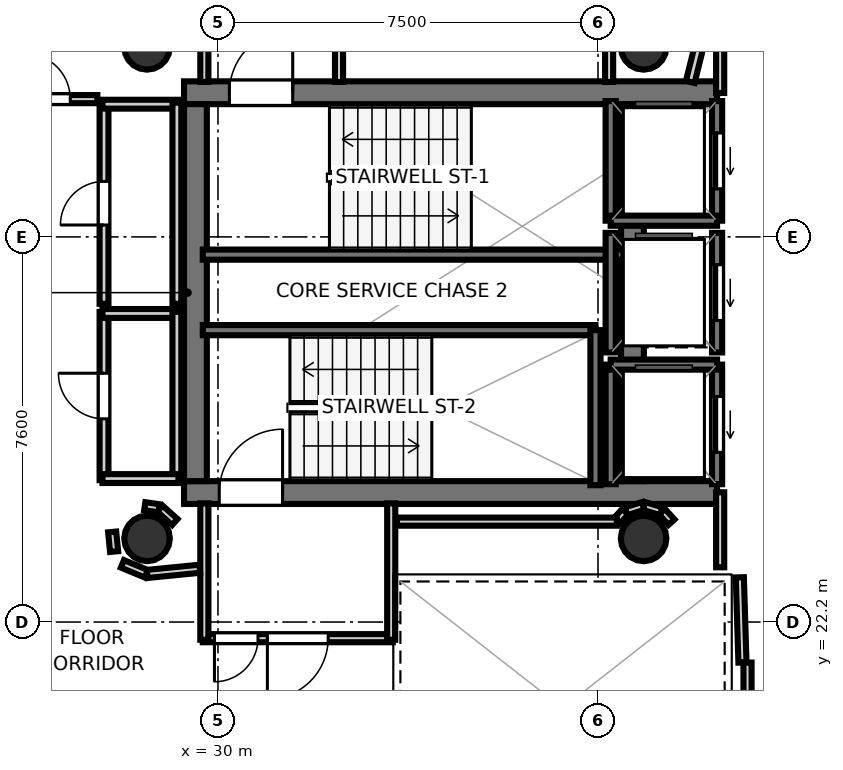
"""IFC4 building model, lengths in metres.
Left out: names, types, materials, properties, quantities, classifications, styles, units other than length and angle.
Written with IfcOpenShell. Run it as: python <this file> out.ifc"""

import sys

from ifc_helpers import new_model, si_unit, direction, frame, frame_2d, origin, origin_2d, place, context, subcontext, project, spatial, rectangle, hollow_circle, extrude, element, fill, save


model = new_model("IFC4")
c1 = context("Model", 3, precision=1e-05, world=origin(), true_north=direction((0.0, 1.0)))
c2 = subcontext(c1, "Body", "Model", "MODEL_VIEW")
j1 = project(units=[si_unit("LENGTHUNIT", "METRE"), si_unit("PLANEANGLEUNIT", "RADIAN")], contexts=[c1])
p1 = place(None, origin())
s1 = spatial("IfcSite", under=j1, at=p1, CompositionType="ELEMENT")
p2 = place(p1, origin())
s2 = spatial("IfcBuilding", under=s1, at=p2, CompositionType="ELEMENT")
p3 = place(p2, frame((0.0, 0.0, 310.2)))
s3 = spatial("IfcBuildingStorey", under=s2, at=p3, CompositionType="ELEMENT", Elevation=310.2)
p4 = place(p3, frame((29.33, 32.645, 0.0), z_axis=(0.0, 0.0, 1.0), x_axis=(1.0, 0.0, 0.0)))
e1 = element("IfcWall", 1, at=p4, inside=s3, PredefinedType="SHEAR", context=c2, shape_type="SweptSolid", body=[
    extrude(rectangle(XDim=10.52, YDim=0.45, at=frame_2d((5.26, 0.0))), origin(), (0.0, 0.0, 1.0), 3.52),
])
p5 = place(p4, frame((0.895, 0.0, 0.0)))
e2 = element("IfcOpeningElement", 2, at=p5, cuts=e1, PredefinedType="OPENING", context=c2, shape_type="SweptSolid", body=[
    extrude(rectangle(XDim=1.25, YDim=2.15, at=frame_2d((0.625, 1.075))), frame((0.0, 0.235, 0.0), z_axis=(0.0, -1.0, 0.0), x_axis=(1.0, 0.0, 0.0)), (0.0, 0.0, 1.0), 0.47),
])
p6 = place(p3, frame((29.33, 24.755, 0.0), z_axis=(0.0, 0.0, 1.0), x_axis=(1.0, 0.0, 0.0)))
e3 = element("IfcWall", 3, at=p6, inside=s3, PredefinedType="SHEAR", context=c2, shape_type="SweptSolid", body=[
    extrude(rectangle(XDim=10.52, YDim=0.45, at=frame_2d((5.26, 0.0))), origin(), (0.0, 0.0, 1.0), 3.52),
])
p7 = place(p6, frame((0.695, 0.0, 0.0)))
e4 = element("IfcOpeningElement", 4, at=p7, cuts=e3, PredefinedType="OPENING", context=c2, shape_type="SweptSolid", body=[
    extrude(rectangle(XDim=1.25, YDim=2.15, at=frame_2d((0.625, 1.075))), frame((0.0, 0.235, 0.0), z_axis=(0.0, -1.0, 0.0), x_axis=(1.0, 0.0, 0.0)), (0.0, 0.0, 1.0), 0.47),
])
for number, where, z_axis, x_axis in (
    (5, (29.555, 24.98, 0.0), (0.0, 0.0, 1.0), (0.0, 1.0, 0.0)),
    (6, (38.18, 24.98, 0.0), (0.0, 0.0, 1.0), (0.0, 1.0, 0.0)),
):
    element("IfcWall", number, at=place(p3, frame(where, z_axis=z_axis, x_axis=x_axis)), inside=s3, PredefinedType="SHEAR", context=c2, shape_type="SweptSolid", body=[
        extrude(rectangle(XDim=7.44, YDim=0.45, at=frame_2d((3.72, 0.0))), origin(), (0.0, 0.0, 1.0), 3.52),
    ])
for number, where, z_axis, x_axis in (
    (7, (28.6, 33.55, 0.0), (0.0, 0.0, 1.0), (1.0, 0.0, 0.0)),
    (8, (28.6, 23.85, 0.0), (0.0, 0.0, 1.0), (1.0, 0.0, 0.0)),
    (9, (38.4, 33.55, 0.0), (0.0, 0.0, 1.0), (1.0, 0.0, 0.0)),
    (10, (38.4, 23.85, 0.0), (0.0, 0.0, 1.0), (1.0, 0.0, 0.0)),
):
    element("IfcColumn", number, at=place(p3, frame(where, z_axis=z_axis, x_axis=x_axis)), inside=s3, PredefinedType="COLUMN", context=c2, shape_type="SweptSolid", body=[
        extrude(hollow_circle(Radius=0.45, WallThickness=0.025, at=origin_2d()), origin(), (0.0, 0.0, 1.0), 3.7),
    ])
p8 = place(p3, frame((29.7, 29.45, 0.0), z_axis=(0.0, 0.0, 1.0), x_axis=(1.0, 0.0, 0.0)))
e11 = element("IfcWall", 11, at=p8, inside=s3, PredefinedType="SOLIDWALL", context=c2, shape_type="SweptSolid", body=[
    extrude(rectangle(XDim=8.3, YDim=0.2, at=frame_2d((4.15, 0.0))), origin(), (0.0, 0.0, 1.0), 3.52),
])
p9 = place(p3, frame((29.7, 27.96, 0.0), z_axis=(0.0, 0.0, 1.0), x_axis=(1.0, 0.0, 0.0)))
e12 = element("IfcWall", 12, at=p9, inside=s3, PredefinedType="SOLIDWALL", context=c2, shape_type="SweptSolid", body=[
    extrude(rectangle(XDim=7.75, YDim=0.2, at=frame_2d((3.875, 0.0))), origin(), (0.0, 0.0, 1.0), 3.52),
])
p10 = place(p3, frame((37.45, 24.9, 0.0), z_axis=(0.0, 0.0, 1.0), x_axis=(0.0, 1.0, 0.0)))
e13 = element("IfcWall", 13, at=p10, inside=s3, PredefinedType="SOLIDWALL", context=c2, shape_type="SweptSolid", body=[
    extrude(rectangle(XDim=3.06, YDim=0.2, at=frame_2d((1.53, 0.0))), origin(), (0.0, 0.0, 1.0), 3.52),
])
p11 = place(p3, frame((39.85, 30.12, 0.0), z_axis=(0.0, 0.0, 1.0), x_axis=(0.0, 1.0, 0.0)))
e14 = element("IfcWall", 14, at=p11, inside=s3, PredefinedType="SOLIDWALL", context=c2, shape_type="SweptSolid", body=[
    extrude(rectangle(XDim=2.36, YDim=0.2, at=frame_2d((1.18, 0.0))), origin(), (0.0, 0.0, 1.0), 3.52),
])
p12 = place(p11, frame((0.63, 0.0, 0.0)))
e15 = element("IfcOpeningElement", 15, at=p12, cuts=e14, PredefinedType="OPENING", context=c2, shape_type="SweptSolid", body=[
    extrude(rectangle(XDim=1.1, YDim=2.15, at=frame_2d((0.55, 1.075))), frame((0.0, 0.11, 0.0), z_axis=(0.0, -1.0, 0.0), x_axis=(1.0, 0.0, 0.0)), (0.0, 0.0, 1.0), 0.22),
])
p13 = place(p3, frame((37.75, 30.12, 0.0), z_axis=(0.0, 0.0, 1.0), x_axis=(0.0, 1.0, 0.0)))
e16 = element("IfcWall", 16, at=p13, inside=s3, PredefinedType="SOLIDWALL", context=c2, shape_type="SweptSolid", body=[
    extrude(rectangle(XDim=2.36, YDim=0.2, at=frame_2d((1.18, 0.0))), origin(), (0.0, 0.0, 1.0), 3.52),
])
p14 = place(p3, frame((37.75, 30.12, 0.0), z_axis=(0.0, 0.0, 1.0), x_axis=(1.0, 0.0, 0.0)))
e17 = element("IfcWall", 17, at=p14, inside=s3, PredefinedType="SOLIDWALL", context=c2, shape_type="SweptSolid", body=[
    extrude(rectangle(XDim=2.1, YDim=0.2, at=frame_2d((1.05, 0.0))), origin(), (0.0, 0.0, 1.0), 3.52),
])
p15 = place(p3, frame((39.85, 24.92, 0.0), z_axis=(0.0, 0.0, 1.0), x_axis=(0.0, 1.0, 0.0)))
e18 = element("IfcWall", 18, at=p15, inside=s3, PredefinedType="SOLIDWALL", context=c2, shape_type="SweptSolid", body=[
    extrude(rectangle(XDim=2.36, YDim=0.2, at=frame_2d((1.18, 0.0))), origin(), (0.0, 0.0, 1.0), 3.52),
])
p16 = place(p15, frame((0.63, 0.0, 0.0)))
e19 = element("IfcOpeningElement", 19, at=p16, cuts=e18, PredefinedType="OPENING", context=c2, shape_type="SweptSolid", body=[
    extrude(rectangle(XDim=1.1, YDim=2.15, at=frame_2d((0.55, 1.075))), frame((0.0, 0.11, 0.0), z_axis=(0.0, -1.0, 0.0), x_axis=(1.0, 0.0, 0.0)), (0.0, 0.0, 1.0), 0.22),
])
p17 = place(p3, frame((37.75, 24.92, 0.0), z_axis=(0.0, 0.0, 1.0), x_axis=(0.0, 1.0, 0.0)))
e20 = element("IfcWall", 20, at=p17, inside=s3, PredefinedType="SOLIDWALL", context=c2, shape_type="SweptSolid", body=[
    extrude(rectangle(XDim=2.36, YDim=0.2, at=frame_2d((1.18, 0.0))), origin(), (0.0, 0.0, 1.0), 3.52),
])
p18 = place(p3, frame((37.75, 27.28, 0.0), z_axis=(0.0, 0.0, 1.0), x_axis=(1.0, 0.0, 0.0)))
e21 = element("IfcWall", 21, at=p18, inside=s3, PredefinedType="SOLIDWALL", context=c2, shape_type="SweptSolid", body=[
    extrude(rectangle(XDim=2.1, YDim=0.2, at=frame_2d((1.05, 0.0))), origin(), (0.0, 0.0, 1.0), 3.52),
])
p19 = place(p3, frame((39.85, 27.52, 0.0), z_axis=(0.0, 0.0, 1.0), x_axis=(0.0, 1.0, 0.0)))
e22 = element("IfcWall", 22, at=p19, inside=s3, PredefinedType="SOLIDWALL", context=c2, shape_type="SweptSolid", body=[
    extrude(rectangle(XDim=2.36, YDim=0.2, at=frame_2d((1.18, 0.0))), origin(), (0.0, 0.0, 1.0), 3.52),
])
p20 = place(p19, frame((0.63, 0.0, 0.0)))
e23 = element("IfcOpeningElement", 23, at=p20, cuts=e22, PredefinedType="OPENING", context=c2, shape_type="SweptSolid", body=[
    extrude(rectangle(XDim=1.1, YDim=2.15, at=frame_2d((0.55, 1.075))), frame((0.0, 0.11, 0.0), z_axis=(0.0, -1.0, 0.0), x_axis=(1.0, 0.0, 0.0)), (0.0, 0.0, 1.0), 0.22),
])
p21 = place(p3, frame((37.75, 27.52, 0.0), z_axis=(0.0, 0.0, 1.0), x_axis=(0.0, 1.0, 0.0)))
e24 = element("IfcWall", 24, at=p21, inside=s3, PredefinedType="SOLIDWALL", context=c2, shape_type="SweptSolid", body=[
    extrude(rectangle(XDim=2.36, YDim=0.2, at=frame_2d((1.18, 0.0))), origin(), (0.0, 0.0, 1.0), 3.52),
])
p22 = place(p3, frame((29.731, 32.858, 0.0), z_axis=(0.0, 0.0, 1.0), x_axis=(0.0, 1.0, 0.0)))
e25 = element("IfcWall", 25, at=p22, inside=s3, PredefinedType="PARTITIONING", context=c2, shape_type="SweptSolid", body=[
    extrude(rectangle(XDim=2.193, YDim=0.16, at=frame_2d((1.096, 0.0))), origin(), (0.0, 0.0, 1.0), 2.84),
])
p23 = place(p3, frame((32.389, 35.708, 0.0), z_axis=(0.0, 0.0, 1.0), x_axis=(0.0, -1.0, 0.0)))
e26 = element("IfcWall", 26, at=p23, inside=s3, PredefinedType="PARTITIONING", context=c2, shape_type="SweptSolid", body=[
    extrude(rectangle(XDim=2.85, YDim=0.16, at=frame_2d((1.425, 0.0))), origin(), (0.0, 0.0, 1.0), 2.84),
])
p24 = place(p3, frame((33.45, 21.881, 0.0), z_axis=(0.0, 0.0, 1.0), x_axis=(-1.0, 0.0, 0.0)))
e27 = element("IfcWall", 27, at=p24, inside=s3, PredefinedType="PARTITIONING", context=c2, shape_type="SweptSolid", body=[
    extrude(rectangle(XDim=3.75, YDim=0.16, at=frame_2d((1.875, 0.0))), origin(), (0.0, 0.0, 1.0), 2.84),
])
p25 = place(p24, frame((1.275, 0.0, 0.0)))
e28 = element("IfcOpeningElement", 28, at=p25, cuts=e27, PredefinedType="OPENING", context=c2, shape_type="SweptSolid", body=[
    extrude(rectangle(XDim=1.2, YDim=2.15, at=frame_2d((0.6, 1.075))), frame((0.0, 0.09, 0.0), z_axis=(0.0, -1.0, 0.0), x_axis=(1.0, 0.0, 0.0)), (0.0, 0.0, 1.0), 0.18),
])
p26 = place(p24, frame((2.66, 0.0, 0.0)))
e29 = element("IfcOpeningElement", 29, at=p26, cuts=e27, PredefinedType="OPENING", context=c2, shape_type="SweptSolid", body=[
    extrude(rectangle(XDim=0.86, YDim=2.05, at=frame_2d((0.43, 1.025))), frame((0.0, 0.09, 0.0), z_axis=(0.0, -1.0, 0.0), x_axis=(1.0, 0.0, 0.0)), (0.0, 0.0, 1.0), 0.18),
])
for number, where, z_axis, x_axis in (
    (30, (29.731, 21.85, 0.0), (0.0, 0.0, 1.0), (0.0, 1.0, 0.0)),
    (31, (33.419, 24.542, 0.0), (0.0, 0.0, 1.0), (0.0, -1.0, 0.0)),
):
    element("IfcWall", number, at=place(p3, frame(where, z_axis=z_axis, x_axis=x_axis)), inside=s3, PredefinedType="PARTITIONING", context=c2, shape_type="SweptSolid", body=[
        extrude(rectangle(XDim=2.692, YDim=0.16, at=frame_2d((1.346, 0.0))), origin(), (0.0, 0.0, 1.0), 2.84),
    ])
p27 = place(p3, frame((40.351, 21.401, 0.0), z_axis=(0.0, 0.0, 1.0), x_axis=(-0.031058045979, 0.999517582527, 0.0)))
e32 = element("IfcWall", 32, at=p27, inside=s3, PredefinedType="PARTITIONING", context=c2, shape_type="SweptSolid", body=[
    extrude(rectangle(XDim=1.682, YDim=0.16, at=frame_2d((0.841, 0.0))), origin(), (0.0, 0.0, 1.0), 2.84),
])
p28 = place(p3, frame((39.911, 23.28, 0.0), z_axis=(0.0, 0.0, 1.0), x_axis=(0.0, 1.0, 0.0)))
e33 = element("IfcWall", 33, at=p28, inside=s3, PredefinedType="PARTITIONING", context=c2, shape_type="SweptSolid", body=[
    extrude(rectangle(XDim=1.48, YDim=0.16, at=frame_2d((0.74, 0.0))), origin(), (0.0, 0.0, 1.0), 2.84),
])
p29 = place(p3, frame((39.911, 32.64, 0.0), z_axis=(0.0, 0.0, 1.0), x_axis=(0.0, 1.0, 0.0)))
e34 = element("IfcWall", 34, at=p29, inside=s3, PredefinedType="PARTITIONING", context=c2, shape_type="SweptSolid", body=[
    extrude(rectangle(XDim=2.88, YDim=0.16, at=frame_2d((1.44, 0.0))), origin(), (0.0, 0.0, 1.0), 2.84),
])
p30 = place(p3, frame((40.451, 18.08, 0.0), z_axis=(0.0, 0.0, 1.0), x_axis=(0.0, 1.0, 0.0)))
e35 = element("IfcWall", 35, at=p30, inside=s3, PredefinedType="PARTITIONING", context=c2, shape_type="SweptSolid", body=[
    extrude(rectangle(XDim=3.32, YDim=0.16, at=frame_2d((1.66, 0.0))), origin(), (0.0, 0.0, 1.0), 2.84),
])
p31 = place(p3, frame((27.751, 25.0, 0.0), z_axis=(0.0, 0.0, 1.0), x_axis=(0.0, 1.0, 0.0)))
e36 = element("IfcWall", 36, at=p31, inside=s3, PredefinedType="PLUMBINGWALL", context=c2, shape_type="SweptSolid", body=[
    extrude(rectangle(XDim=3.32, YDim=0.175, at=frame_2d((1.66, 0.0))), origin(), (0.0, 0.0, 1.0), 2.84),
])
p32 = place(p31, frame((1.21, 0.0, 0.0)))
e37 = element("IfcOpeningElement", 37, at=p32, cuts=e36, PredefinedType="OPENING", context=c2, shape_type="SweptSolid", body=[
    extrude(rectangle(XDim=0.9, YDim=2.1, at=frame_2d((0.45, 1.05))), frame((0.0, 0.097, 0.0), z_axis=(0.0, -1.0, 0.0), x_axis=(1.0, 0.0, 0.0)), (0.0, 0.0, 1.0), 0.195),
])
p33 = place(p3, frame((27.72, 28.289, 0.0), z_axis=(0.0, 0.0, 1.0), x_axis=(1.0, 0.0, 0.0)))
e38 = element("IfcWall", 38, at=p33, inside=s3, PredefinedType="PLUMBINGWALL", context=c2, shape_type="SweptSolid", body=[
    extrude(rectangle(XDim=1.5, YDim=0.175, at=frame_2d((0.75, 0.0))), origin(), (0.0, 0.0, 1.0), 2.84),
])
p34 = place(p3, frame((29.189, 28.32, 0.0), z_axis=(0.0, 0.0, 1.0), x_axis=(0.0, -1.0, 0.0)))
e39 = element("IfcWall", 39, at=p34, inside=s3, PredefinedType="PLUMBINGWALL", context=c2, shape_type="SweptSolid", body=[
    extrude(rectangle(XDim=3.32, YDim=0.175, at=frame_2d((1.66, 0.0))), origin(), (0.0, 0.0, 1.0), 2.84),
])
p35 = place(p3, frame((29.22, 25.031, 0.0), z_axis=(0.0, 0.0, 1.0), x_axis=(-1.0, 0.0, 0.0)))
e40 = element("IfcWall", 40, at=p35, inside=s3, PredefinedType="PLUMBINGWALL", context=c2, shape_type="SweptSolid", body=[
    extrude(rectangle(XDim=1.5, YDim=0.175, at=frame_2d((0.75, 0.0))), origin(), (0.0, 0.0, 1.0), 2.84),
])
p36 = place(p3, frame((27.751, 28.48, 0.0), z_axis=(0.0, 0.0, 1.0), x_axis=(0.0, 1.0, 0.0)))
e41 = element("IfcWall", 41, at=p36, inside=s3, PredefinedType="PLUMBINGWALL", context=c2, shape_type="SweptSolid", body=[
    extrude(rectangle(XDim=3.97, YDim=0.175, at=frame_2d((1.985, 0.0))), origin(), (0.0, 0.0, 1.0), 2.84),
])
p37 = place(p36, frame((1.555, 0.0, 0.0)))
e42 = element("IfcOpeningElement", 42, at=p37, cuts=e41, PredefinedType="OPENING", context=c2, shape_type="SweptSolid", body=[
    extrude(rectangle(XDim=0.86, YDim=2.05, at=frame_2d((0.43, 1.025))), frame((0.0, 0.097, 0.0), z_axis=(0.0, -1.0, 0.0), x_axis=(1.0, 0.0, 0.0)), (0.0, 0.0, 1.0), 0.195),
])
p38 = place(p3, frame((27.72, 32.419, 0.0), z_axis=(0.0, 0.0, 1.0), x_axis=(1.0, 0.0, 0.0)))
e43 = element("IfcWall", 43, at=p38, inside=s3, PredefinedType="PLUMBINGWALL", context=c2, shape_type="SweptSolid", body=[
    extrude(rectangle(XDim=1.5, YDim=0.175, at=frame_2d((0.75, 0.0))), origin(), (0.0, 0.0, 1.0), 2.84),
])
p39 = place(p3, frame((29.189, 32.45, 0.0), z_axis=(0.0, 0.0, 1.0), x_axis=(0.0, -1.0, 0.0)))
e44 = element("IfcWall", 44, at=p39, inside=s3, PredefinedType="PLUMBINGWALL", context=c2, shape_type="SweptSolid", body=[
    extrude(rectangle(XDim=3.97, YDim=0.175, at=frame_2d((1.985, 0.0))), origin(), (0.0, 0.0, 1.0), 2.84),
])
p40 = place(p3, frame((38.951, 24.171, 0.0), z_axis=(0.0, 0.0, 1.0), x_axis=(-0.674186852077, 0.738560822469, 0.0)))
e45 = element("IfcWall", 45, at=p40, inside=s3, PredefinedType="PARTITIONING", context=c2, shape_type="SweptSolid", body=[
    extrude(rectangle(XDim=0.281, YDim=0.16, at=frame_2d((0.14, 0.0))), origin(), (0.0, 0.0, 1.0), 2.84),
])
p41 = place(p3, frame((38.748, 24.387, 0.0), z_axis=(0.0, 0.0, 1.0), x_axis=(-0.956948991291, 0.290256142171, 0.0)))
e46 = element("IfcWall", 46, at=p41, inside=s3, PredefinedType="PARTITIONING", context=c2, shape_type="SweptSolid", body=[
    extrude(rectangle(XDim=0.354, YDim=0.16, at=frame_2d((0.177, 0.0))), origin(), (0.0, 0.0, 1.0), 2.84),
])
p42 = place(p3, frame((38.391, 24.49, 0.0), z_axis=(0.0, 0.0, 1.0), x_axis=(-0.957007018611, -0.290064762301, 0.0)))
e47 = element("IfcWall", 47, at=p42, inside=s3, PredefinedType="PARTITIONING", context=c2, shape_type="SweptSolid", body=[
    extrude(rectangle(XDim=0.354, YDim=0.16, at=frame_2d((0.177, 0.0))), origin(), (0.0, 0.0, 1.0), 2.84),
])
p43 = place(p3, frame((38.038, 24.378, 0.0), z_axis=(0.0, 0.0, 1.0), x_axis=(-0.673658387955, -0.739042878551, 0.0)))
e48 = element("IfcWall", 48, at=p43, inside=s3, PredefinedType="PARTITIONING", context=c2, shape_type="SweptSolid", body=[
    extrude(rectangle(XDim=0.246, YDim=0.16, at=frame_2d((0.123, 0.0))), origin(), (0.0, 0.0, 1.0), 2.84),
])
p44 = place(p3, frame((37.872, 24.181, 0.0), z_axis=(0.0, 0.0, 1.0), x_axis=(-1.0, 0.0, 0.0)))
e49 = element("IfcWall", 49, at=p44, inside=s3, PredefinedType="PARTITIONING", context=c2, shape_type="SweptSolid", body=[
    extrude(rectangle(XDim=4.342, YDim=0.16, at=frame_2d((2.171, 0.0))), origin(), (0.0, 0.0, 1.0), 2.84),
])
p45 = place(p3, frame((29.149, 24.173, 0.0), z_axis=(0.0, 0.0, 1.0), x_axis=(-0.745225165416, 0.666812906917, 0.0)))
e50 = element("IfcWall", 50, at=p45, inside=s3, PredefinedType="PARTITIONING", context=c2, shape_type="SweptSolid", body=[
    extrude(rectangle(XDim=0.396, YDim=0.16, at=frame_2d((0.198, 0.0))), origin(), (0.0, 0.0, 1.0), 2.84),
])
p46 = place(p3, frame((28.838, 24.444, 0.0), z_axis=(0.0, 0.0, 1.0), x_axis=(-0.989449148305, 0.144880581578, 0.0)))
e51 = element("IfcWall", 51, at=p46, inside=s3, PredefinedType="PARTITIONING", context=c2, shape_type="SweptSolid", body=[
    extrude(rectangle(XDim=0.286, YDim=0.16, at=frame_2d((0.143, 0.0))), origin(), (0.0, 0.0, 1.0), 2.84),
])
p47 = place(p3, frame((37.719, 35.5, 0.0), z_axis=(0.0, 0.0, 1.0), x_axis=(0.0, -1.0, 0.0)))
e52 = element("IfcWall", 52, at=p47, inside=s3, PredefinedType="PARTITIONING", context=c2, shape_type="SweptSolid", body=[
    extrude(rectangle(XDim=2.642, YDim=0.16, at=frame_2d((1.321, 0.0))), origin(), (0.0, 0.0, 1.0), 2.84),
])
p48 = place(p3, frame((25.65, 32.519, 0.0), z_axis=(0.0, 0.0, 1.0), x_axis=(1.0, 0.0, 0.0)))
e53 = element("IfcWall", 53, at=p48, inside=s3, PredefinedType="PARTITIONING", context=c2, shape_type="SweptSolid", body=[
    extrude(rectangle(XDim=1.97, YDim=0.16, at=frame_2d((0.985, 0.0))), origin(), (0.0, 0.0, 1.0), 2.84),
])
p49 = place(p48, frame((0.535, 0.0, 0.0)))
e54 = element("IfcOpeningElement", 54, at=p49, cuts=e53, PredefinedType="OPENING", context=c2, shape_type="SweptSolid", body=[
    extrude(rectangle(XDim=0.9, YDim=2.1, at=frame_2d((0.45, 1.05))), frame((0.0, 0.09, 0.0), z_axis=(0.0, -1.0, 0.0), x_axis=(1.0, 0.0, 0.0)), (0.0, 0.0, 1.0), 0.18),
])
p50 = place(p3, frame((27.912, 23.978, 0.0), z_axis=(0.0, 0.0, 1.0), x_axis=(0.097888269922, -0.995197410875, 0.0)))
e55 = element("IfcWall", 55, at=p50, inside=s3, PredefinedType="PARTITIONING", context=c2, shape_type="SweptSolid", body=[
    extrude(rectangle(XDim=0.389, YDim=0.16, at=frame_2d((0.195, 0.0))), origin(), (0.0, 0.0, 1.0), 2.84),
])
p51 = place(p3, frame((28.115, 23.348, 0.0), z_axis=(0.0, 0.0, 1.0), x_axis=(0.923807847969, -0.382856448334, 0.0)))
e56 = element("IfcWall", 56, at=p51, inside=s3, PredefinedType="PARTITIONING", context=c2, shape_type="SweptSolid", body=[
    extrude(rectangle(XDim=0.513, YDim=0.16, at=frame_2d((0.256, 0.0))), origin(), (0.0, 0.0, 1.0), 2.84),
])
p52 = place(p3, frame((28.603, 23.149, 0.0), z_axis=(0.0, 0.0, 1.0), x_axis=(0.995179827095, 0.098066873836, 0.0)))
e57 = element("IfcWall", 57, at=p52, inside=s3, PredefinedType="PARTITIONING", context=c2, shape_type="SweptSolid", body=[
    extrude(rectangle(XDim=1.043, YDim=0.16, at=frame_2d((0.521, 0.0))), origin(), (0.0, 0.0, 1.0), 2.84),
])
p53 = place(p3, frame((39.77, 34.662, 0.0), z_axis=(0.0, 0.0, 1.0), x_axis=(-0.241886708188, -0.970304498805, 0.0)))
e58 = element("IfcWall", 58, at=p53, inside=s3, PredefinedType="PLUMBINGWALL", context=c2, shape_type="SweptSolid", body=[
    extrude(rectangle(XDim=1.859, YDim=0.175, at=frame_2d((0.93, 0.0))), origin(), (0.0, 0.0, 1.0), 2.84),
])
p54 = place(p5, origin())
e59 = element("IfcDoor", 59, at=p54, inside=s3, OperationType="SINGLE_SWING_RIGHT", PredefinedType="DOOR", context=c2, shape_type="SweptSolid", body=[
    extrude(rectangle(XDim=1.25, YDim=2.15, at=frame_2d((0.625, 1.075))), frame((0.0, 0.025, 0.0), z_axis=(0.0, -1.0, 0.0), x_axis=(1.0, 0.0, 0.0)), (0.0, 0.0, 1.0), 0.05),
])
fill(e2, e59)
p55 = place(p7, origin())
e60 = element("IfcDoor", 60, at=p55, inside=s3, OperationType="SINGLE_SWING_RIGHT", PredefinedType="DOOR", context=c2, shape_type="SweptSolid", body=[
    extrude(rectangle(XDim=1.25, YDim=2.15, at=frame_2d((0.625, 1.075))), frame((0.0, 0.025, 0.0), z_axis=(0.0, -1.0, 0.0), x_axis=(1.0, 0.0, 0.0)), (0.0, 0.0, 1.0), 0.05),
])
fill(e4, e60)
p56 = place(p12, origin())
e61 = element("IfcDoor", 61, at=p56, inside=s3, OperationType="SLIDING_TO_LEFT", PredefinedType="DOOR", context=c2, shape_type="SweptSolid", body=[
    extrude(rectangle(XDim=1.1, YDim=2.15, at=frame_2d((0.55, 1.075))), frame((0.0, 0.025, 0.0), z_axis=(0.0, -1.0, 0.0), x_axis=(1.0, 0.0, 0.0)), (0.0, 0.0, 1.0), 0.05),
])
fill(e15, e61)
p57 = place(p16, origin())
e62 = element("IfcDoor", 62, at=p57, inside=s3, OperationType="SLIDING_TO_LEFT", PredefinedType="DOOR", context=c2, shape_type="SweptSolid", body=[
    extrude(rectangle(XDim=1.1, YDim=2.15, at=frame_2d((0.55, 1.075))), frame((0.0, 0.025, 0.0), z_axis=(0.0, -1.0, 0.0), x_axis=(1.0, 0.0, 0.0)), (0.0, 0.0, 1.0), 0.05),
])
fill(e19, e62)
p58 = place(p20, origin())
e63 = element("IfcDoor", 63, at=p58, inside=s3, OperationType="SLIDING_TO_LEFT", PredefinedType="DOOR", context=c2, shape_type="SweptSolid", body=[
    extrude(rectangle(XDim=1.1, YDim=2.15, at=frame_2d((0.55, 1.075))), frame((0.0, 0.025, 0.0), z_axis=(0.0, -1.0, 0.0), x_axis=(1.0, 0.0, 0.0)), (0.0, 0.0, 1.0), 0.05),
])
fill(e23, e63)
p59 = place(p25, origin())
e64 = element("IfcDoor", 64, at=p59, inside=s3, OperationType="SINGLE_SWING_RIGHT", PredefinedType="DOOR", context=c2, shape_type="SweptSolid", body=[
    extrude(rectangle(XDim=1.2, YDim=2.15, at=frame_2d((0.6, 1.075))), frame((0.0, 0.025, 0.0), z_axis=(0.0, -1.0, 0.0), x_axis=(1.0, 0.0, 0.0)), (0.0, 0.0, 1.0), 0.05),
])
fill(e28, e64)
p60 = place(p32, origin())
e65 = element("IfcDoor", 65, at=p60, inside=s3, OperationType="SINGLE_SWING_RIGHT", PredefinedType="DOOR", context=c2, shape_type="SweptSolid", body=[
    extrude(rectangle(XDim=0.9, YDim=2.1, at=frame_2d((0.45, 1.05))), frame((0.0, 0.025, 0.0), z_axis=(0.0, -1.0, 0.0), x_axis=(1.0, 0.0, 0.0)), (0.0, 0.0, 1.0), 0.05),
])
fill(e37, e65)
p61 = place(p37, origin())
e66 = element("IfcDoor", 66, at=p61, inside=s3, OperationType="SINGLE_SWING_LEFT", PredefinedType="DOOR", context=c2, shape_type="SweptSolid", body=[
    extrude(rectangle(XDim=0.86, YDim=2.05, at=frame_2d((0.43, 1.025))), frame((0.0, 0.025, 0.0), z_axis=(0.0, -1.0, 0.0), x_axis=(1.0, 0.0, 0.0)), (0.0, 0.0, 1.0), 0.05),
])
fill(e42, e66)
p62 = place(p26, origin())
e67 = element("IfcDoor", 67, at=p62, inside=s3, OperationType="SINGLE_SWING_RIGHT", PredefinedType="DOOR", context=c2, shape_type="SweptSolid", body=[
    extrude(rectangle(XDim=0.86, YDim=2.05, at=frame_2d((0.43, 1.025))), frame((0.0, 0.025, 0.0), z_axis=(0.0, -1.0, 0.0), x_axis=(1.0, 0.0, 0.0)), (0.0, 0.0, 1.0), 0.05),
])
fill(e29, e67)
p63 = place(p49, origin())
e68 = element("IfcDoor", 68, at=p63, inside=s3, OperationType="SINGLE_SWING_LEFT", PredefinedType="DOOR", context=c2, shape_type="SweptSolid", body=[
    extrude(rectangle(XDim=0.9, YDim=2.1, at=frame_2d((0.45, 1.05))), frame((0.0, 0.025, 0.0), z_axis=(0.0, -1.0, 0.0), x_axis=(1.0, 0.0, 0.0)), (0.0, 0.0, 1.0), 0.05),
])
fill(e54, e68)
save(model, sys.argv[1])
